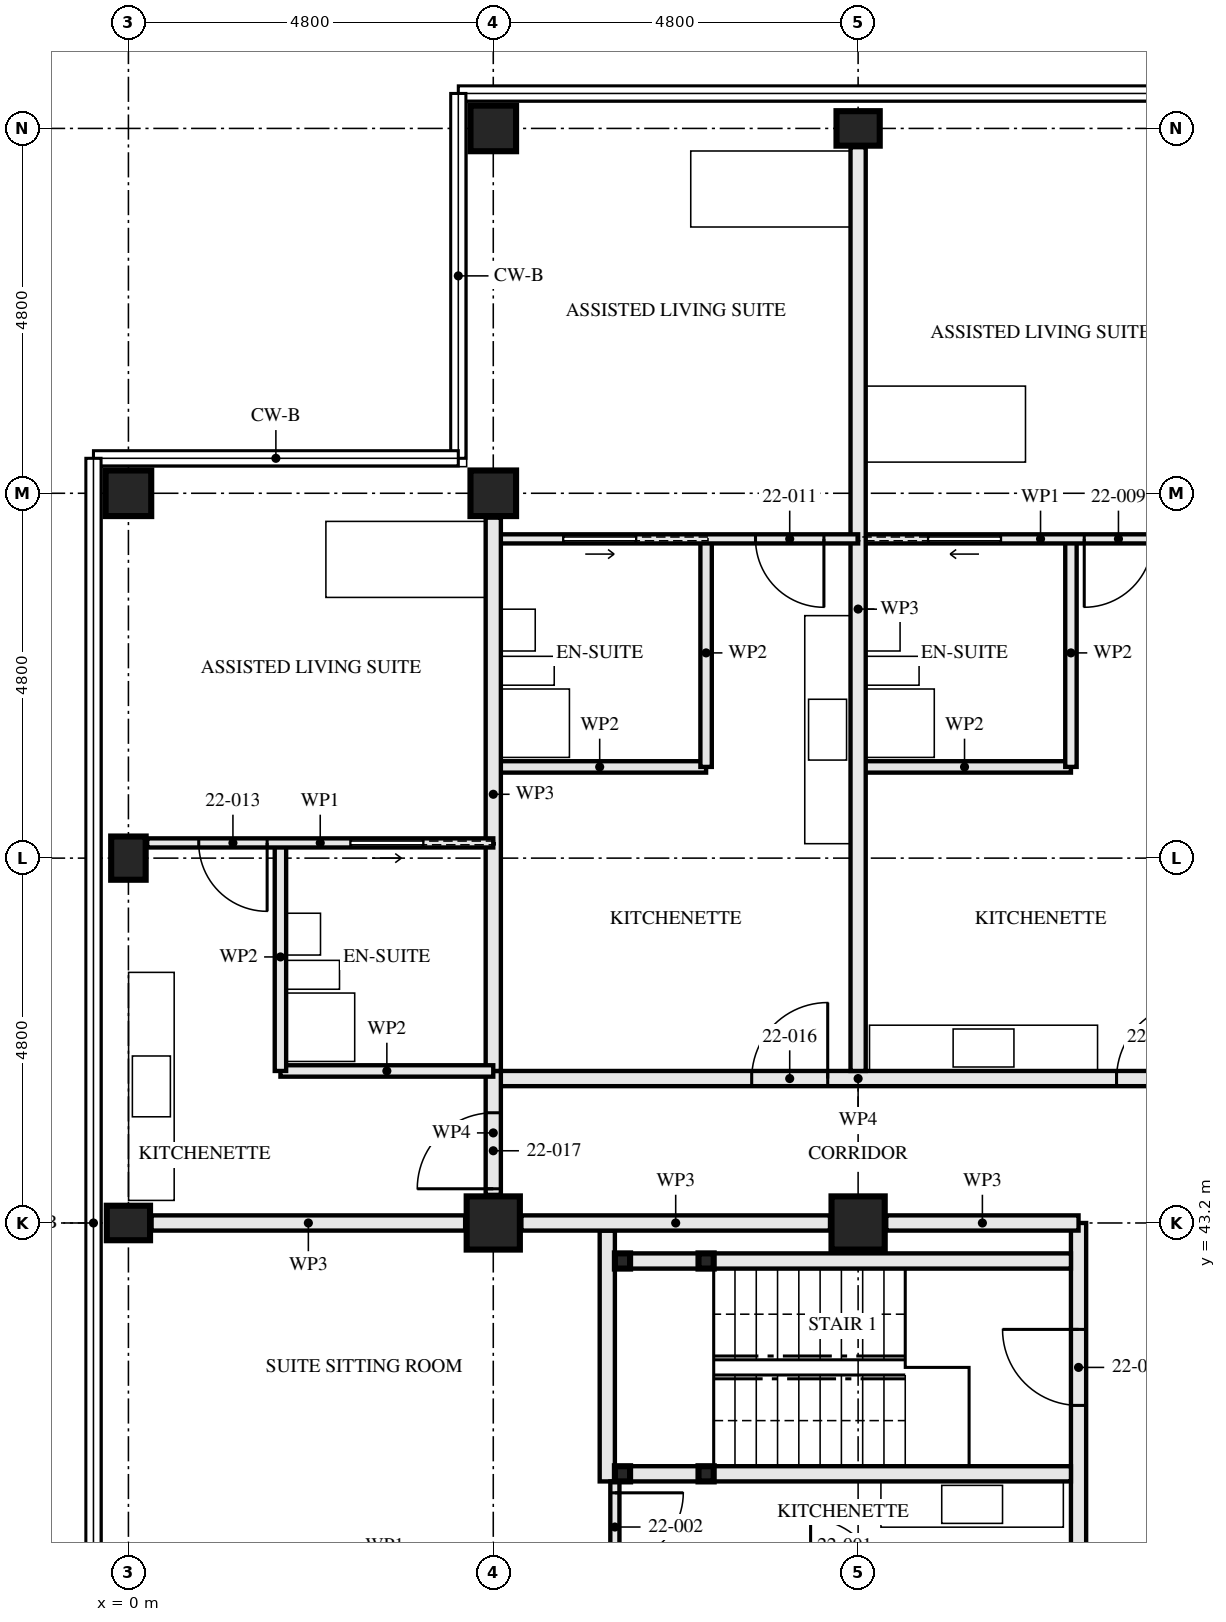
"""IFC4 building model, lengths in metres.
Left out: names, types, materials, properties, quantities, classifications, styles, units other than length and angle.
Written with IfcOpenShell. Run it as: python <this file> out.ifc"""

import sys

from ifc_helpers import new_model, si_unit, direction, frame, frame_2d, origin, origin_2d, place, context, subcontext, project, spatial, rectangle, hollow_rectangle, i_section, extrude, element, fill, save


model = new_model("IFC4")
c1 = context("Model", 3, precision=1e-05, world=origin(), true_north=direction((0.0, 1.0)))
c2 = subcontext(c1, "Body", "Model", "MODEL_VIEW")
j1 = project(units=[si_unit("LENGTHUNIT", "METRE"), si_unit("PLANEANGLEUNIT", "RADIAN")], contexts=[c1])
p1 = place(None, origin())
s1 = spatial("IfcSite", under=j1, at=p1, CompositionType="ELEMENT")
p2 = place(p1, origin())
s2 = spatial("IfcBuilding", under=s1, at=p2, CompositionType="ELEMENT")
p3 = place(p2, frame((0.0, 0.0, 84.0)))
s3 = spatial("IfcBuildingStorey", under=s2, at=p3, CompositionType="ELEMENT", Elevation=84.0)
for number, where, z_axis, x_axis in (
    (1, (0.0, 43.2, 0.0), (0.0, 0.0, 1.0), (0.0, 1.0, 0.0)),
    (2, (0.0, 48.0, 0.0), (0.0, 0.0, 1.0), (1.0, 0.0, 0.0)),
):
    element("IfcColumn", number, at=place(p3, frame(where, z_axis=z_axis, x_axis=x_axis)), inside=s3, PredefinedType="COLUMN", context=c2, shape_type="SweptSolid", body=[
        extrude(i_section(OverallWidth=0.454, OverallDepth=0.569, WebThickness=0.078, FlangeThickness=0.125, FilletRadius=0.015, at=origin_2d()), origin(), (0.0, 0.0, 1.0), 3.5),
    ])
p4 = place(p3, frame((0.0, 52.8, 0.0), z_axis=(0.0, 0.0, 1.0), x_axis=(0.0, 1.0, 0.0)))
e3 = element("IfcColumn", 3, at=p4, inside=s3, PredefinedType="COLUMN", context=c2, shape_type="SweptSolid", body=[
    extrude(hollow_rectangle(XDim=0.6, YDim=0.6, WallThickness=0.05, at=origin_2d()), origin(), (0.0, 0.0, 1.0), 3.5),
])
p5 = place(p3, frame((4.8, 43.2, 0.0), z_axis=(0.0, 0.0, 1.0), x_axis=(0.0, 1.0, 0.0)))
e4 = element("IfcColumn", 4, at=p5, inside=s3, PredefinedType="COLUMN", context=c2, shape_type="SweptSolid", body=[
    extrude(hollow_rectangle(XDim=0.7, YDim=0.7, WallThickness=0.06, at=origin_2d()), origin(), (0.0, 0.0, 1.0), 3.5),
])
for number, where, z_axis, x_axis in (
    (5, (4.8, 52.8, 0.0), (0.0, 0.0, 1.0), (0.0, 1.0, 0.0)),
    (6, (4.8, 57.6, 0.0), (0.0, 0.0, 1.0), (0.0, 1.0, 0.0)),
):
    element("IfcColumn", number, at=place(p3, frame(where, z_axis=z_axis, x_axis=x_axis)), inside=s3, PredefinedType="COLUMN", context=c2, shape_type="SweptSolid", body=[
        extrude(hollow_rectangle(XDim=0.6, YDim=0.6, WallThickness=0.05, at=origin_2d()), origin(), (0.0, 0.0, 1.0), 3.5),
    ])
p6 = place(p3, frame((9.6, 43.2, 0.0), z_axis=(0.0, 0.0, 1.0), x_axis=(0.0, 1.0, 0.0)))
e7 = element("IfcColumn", 7, at=p6, inside=s3, PredefinedType="COLUMN", context=c2, shape_type="SweptSolid", body=[
    extrude(hollow_rectangle(XDim=0.7, YDim=0.7, WallThickness=0.06, at=origin_2d()), origin(), (0.0, 0.0, 1.0), 3.5),
])
p7 = place(p3, frame((9.6, 57.6, 0.0), z_axis=(0.0, 0.0, 1.0), x_axis=(0.0, 1.0, 0.0)))
e8 = element("IfcColumn", 8, at=p7, inside=s3, PredefinedType="COLUMN", context=c2, shape_type="SweptSolid", body=[
    extrude(i_section(OverallWidth=0.454, OverallDepth=0.569, WebThickness=0.078, FlangeThickness=0.125, FilletRadius=0.015, at=origin_2d()), origin(), (0.0, 0.0, 1.0), 3.5),
])
for number, where, z_axis, x_axis in (
    (9, (6.5, 42.7, 0.0), (0.0, 0.0, 1.0), (1.0, 0.0, 0.0)),
    (10, (6.5, 39.9, 0.0), (0.0, 0.0, 1.0), (1.0, 0.0, 0.0)),
    (11, (7.6, 42.7, 0.0), (0.0, 0.0, 1.0), (1.0, 0.0, 0.0)),
    (12, (7.6, 39.9, 0.0), (0.0, 0.0, 1.0), (1.0, 0.0, 0.0)),
):
    element("IfcColumn", number, at=place(p3, frame(where, z_axis=z_axis, x_axis=x_axis)), inside=s3, PredefinedType="COLUMN", context=c2, shape_type="SweptSolid", body=[
        extrude(hollow_rectangle(XDim=0.2, YDim=0.2, WallThickness=0.008, at=origin_2d()), origin(), (0.0, 0.0, 1.0), 3.33),
    ])
p8 = place(p3, frame((6.6, 42.7, 0.0), z_axis=(0.0, 0.0, 1.0), x_axis=(1.0, 0.0, 0.0)))
e13 = element("IfcWall", 13, at=p8, inside=s3, PredefinedType="SOLIDWALL", context=c2, shape_type="SweptSolid", body=[
    extrude(rectangle(XDim=0.9, YDim=0.2, at=frame_2d((0.45, 0.0))), origin(), (0.0, 0.0, 1.0), 2.99),
])
p9 = place(p3, frame((7.7, 42.7, 0.0), z_axis=(0.0, 0.0, 1.0), x_axis=(1.0, 0.0, 0.0)))
e14 = element("IfcWall", 14, at=p9, inside=s3, PredefinedType="SOLIDWALL", context=c2, shape_type="SweptSolid", body=[
    extrude(rectangle(XDim=4.7, YDim=0.2, at=frame_2d((2.35, 0.0))), origin(), (0.0, 0.0, 1.0), 2.99),
])
p10 = place(p3, frame((6.6, 39.9, 0.0), z_axis=(0.0, 0.0, 1.0), x_axis=(1.0, 0.0, 0.0)))
e15 = element("IfcWall", 15, at=p10, inside=s3, PredefinedType="SOLIDWALL", context=c2, shape_type="SweptSolid", body=[
    extrude(rectangle(XDim=0.9, YDim=0.2, at=frame_2d((0.45, 0.0))), origin(), (0.0, 0.0, 1.0), 2.99),
])
p11 = place(p3, frame((7.7, 39.9, 0.0), z_axis=(0.0, 0.0, 1.0), x_axis=(1.0, 0.0, 0.0)))
e16 = element("IfcWall", 16, at=p11, inside=s3, PredefinedType="SOLIDWALL", context=c2, shape_type="SweptSolid", body=[
    extrude(rectangle(XDim=4.7, YDim=0.2, at=frame_2d((2.35, 0.0))), origin(), (0.0, 0.0, 1.0), 2.99),
])
p12 = place(p3, frame((6.3, 43.1, 0.0), z_axis=(0.0, 0.0, 1.0), x_axis=(0.0, -1.0, 0.0)))
e17 = element("IfcWall", 17, at=p12, inside=s3, PredefinedType="SOLIDWALL", context=c2, shape_type="SweptSolid", body=[
    extrude(rectangle(XDim=3.3, YDim=0.2, at=frame_2d((1.65, 0.0))), origin(), (0.0, 0.0, 1.0), 3.33),
])
p13 = place(p3, frame((6.4, 39.8, 0.0), z_axis=(0.0, 0.0, 1.0), x_axis=(0.0, -1.0, 0.0)))
e18 = element("IfcWall", 18, at=p13, inside=s3, PredefinedType="PARTITIONING", context=c2, shape_type="SweptSolid", body=[
    extrude(rectangle(XDim=1.4, YDim=0.12, at=frame_2d((0.7, 0.0))), origin(), (0.0, 0.0, 1.0), 3.33),
])
p14 = place(p13, frame((0.15, 0.0, 0.0)))
e19 = element("IfcOpeningElement", 19, at=p14, cuts=e18, PredefinedType="OPENING", context=c2, shape_type="SweptSolid", body=[
    extrude(rectangle(XDim=0.9, YDim=2.1, at=frame_2d((0.45, 1.05))), frame((0.0, 0.071, 0.0), z_axis=(0.0, -1.0, 0.0), x_axis=(1.0, 0.0, 0.0)), (0.0, 0.0, 1.0), 0.141),
])
p15 = place(p3, frame((12.5, 43.2, 0.0), z_axis=(0.0, 0.0, 1.0), x_axis=(0.0, -1.0, 0.0)))
e20 = element("IfcWall", 20, at=p15, inside=s3, PredefinedType="PARTITIONING", context=c2, shape_type="SweptSolid", body=[
    extrude(rectangle(XDim=12.4, YDim=0.2, at=frame_2d((6.2, 0.0))), origin(), (0.0, 0.0, 1.0), 2.55),
])
p16 = place(p15, frame((1.4, 0.0, 0.0)))
e21 = element("IfcOpeningElement", 21, at=p16, cuts=e20, PredefinedType="OPENING", context=c2, shape_type="SweptSolid", body=[
    extrude(rectangle(XDim=1.0, YDim=2.1, at=frame_2d((0.5, 1.05))), frame((0.0, 0.111, 0.0), z_axis=(0.0, -1.0, 0.0), x_axis=(1.0, 0.0, 0.0)), (0.0, 0.0, 1.0), 0.221),
])
p17 = place(p15, frame((5.2, 0.0, 0.0)))
e22 = element("IfcOpeningElement", 22, at=p17, cuts=e20, PredefinedType="OPENING", context=c2, shape_type="SweptSolid", body=[
    extrude(rectangle(XDim=1.0, YDim=2.1, at=frame_2d((0.5, 1.05))), frame((0.0, 0.111, 0.0), z_axis=(0.0, -1.0, 0.0), x_axis=(1.0, 0.0, 0.0)), (0.0, 0.0, 1.0), 0.221),
])
p18 = place(p3, frame((12.4, 52.2, 0.0), z_axis=(0.0, 0.0, 1.0), x_axis=(0.0, -1.0, 0.0)))
e23 = element("IfcWall", 23, at=p18, inside=s3, PredefinedType="PARTITIONING", context=c2, shape_type="SweptSolid", body=[
    extrude(rectangle(XDim=3.0, YDim=0.15, at=frame_2d((1.5, 0.0))), origin(), (0.0, 0.0, 1.0), 3.33),
])
p19 = place(p3, frame((12.4, 49.2, 0.0), z_axis=(0.0, 0.0, 1.0), x_axis=(-1.0, 0.0, 0.0)))
e24 = element("IfcWall", 24, at=p19, inside=s3, PredefinedType="PARTITIONING", context=c2, shape_type="SweptSolid", body=[
    extrude(rectangle(XDim=2.8, YDim=0.15, at=frame_2d((1.4, 0.0))), origin(), (0.0, 0.0, 1.0), 3.33),
])
p20 = place(p3, frame((14.4, 52.2, 0.0), z_axis=(0.0, 0.0, 1.0), x_axis=(-1.0, 0.0, 0.0)))
e25 = element("IfcWall", 25, at=p20, inside=s3, PredefinedType="PARTITIONING", context=c2, shape_type="SweptSolid", body=[
    extrude(rectangle(XDim=4.8, YDim=0.12, at=frame_2d((2.4, 0.0))), origin(), (0.0, 0.0, 1.0), 3.33),
])
p21 = place(p20, frame((0.925, 0.0, 0.0)))
e26 = element("IfcOpeningElement", 26, at=p21, cuts=e25, PredefinedType="OPENING", context=c2, shape_type="SweptSolid", body=[
    extrude(rectangle(XDim=0.9, YDim=2.1, at=frame_2d((0.45, 1.05))), frame((0.0, 0.071, 0.0), z_axis=(0.0, -1.0, 0.0), x_axis=(1.0, 0.0, 0.0)), (0.0, 0.0, 1.0), 0.141),
])
p22 = place(p20, frame((2.925, 0.0, 0.0)))
e27 = element("IfcOpeningElement", 27, at=p22, cuts=e25, PredefinedType="OPENING", context=c2, shape_type="SweptSolid", body=[
    extrude(rectangle(XDim=0.95, YDim=2.1, at=frame_2d((0.475, 1.05))), frame((0.0, 0.071, 0.0), z_axis=(0.0, -1.0, 0.0), x_axis=(1.0, 0.0, 0.0)), (0.0, 0.0, 1.0), 0.141),
])
p23 = place(p3, frame((9.6, 57.353, 0.0), z_axis=(0.0, 0.0, 1.0), x_axis=(0.0, -1.0, 0.0)))
e28 = element("IfcWall", 28, at=p23, inside=s3, PredefinedType="PARTITIONING", context=c2, shape_type="SweptSolid", body=[
    extrude(rectangle(XDim=12.153, YDim=0.2, at=frame_2d((6.077, 0.0))), origin(), (0.0, 0.0, 1.0), 2.55),
])
p24 = place(p3, frame((7.6, 52.2, 0.0), z_axis=(0.0, 0.0, 1.0), x_axis=(0.0, -1.0, 0.0)))
e29 = element("IfcWall", 29, at=p24, inside=s3, PredefinedType="PARTITIONING", context=c2, shape_type="SweptSolid", body=[
    extrude(rectangle(XDim=3.0, YDim=0.15, at=frame_2d((1.5, 0.0))), origin(), (0.0, 0.0, 1.0), 3.33),
])
p25 = place(p3, frame((7.6, 49.2, 0.0), z_axis=(0.0, 0.0, 1.0), x_axis=(-1.0, 0.0, 0.0)))
e30 = element("IfcWall", 30, at=p25, inside=s3, PredefinedType="PARTITIONING", context=c2, shape_type="SweptSolid", body=[
    extrude(rectangle(XDim=2.8, YDim=0.15, at=frame_2d((1.4, 0.0))), origin(), (0.0, 0.0, 1.0), 3.33),
])
p26 = place(p3, frame((9.6, 52.2, 0.0), z_axis=(0.0, 0.0, 1.0), x_axis=(-1.0, 0.0, 0.0)))
e31 = element("IfcWall", 31, at=p26, inside=s3, PredefinedType="PARTITIONING", context=c2, shape_type="SweptSolid", body=[
    extrude(rectangle(XDim=4.8, YDim=0.12, at=frame_2d((2.4, 0.0))), origin(), (0.0, 0.0, 1.0), 3.33),
])
p27 = place(p26, frame((0.45, 0.0, 0.0)))
e32 = element("IfcOpeningElement", 32, at=p27, cuts=e31, PredefinedType="OPENING", context=c2, shape_type="SweptSolid", body=[
    extrude(rectangle(XDim=0.9, YDim=2.1, at=frame_2d((0.45, 1.05))), frame((0.0, 0.071, 0.0), z_axis=(0.0, -1.0, 0.0), x_axis=(1.0, 0.0, 0.0)), (0.0, 0.0, 1.0), 0.141),
])
p28 = place(p26, frame((2.925, 0.0, 0.0)))
e33 = element("IfcOpeningElement", 33, at=p28, cuts=e31, PredefinedType="OPENING", context=c2, shape_type="SweptSolid", body=[
    extrude(rectangle(XDim=0.95, YDim=2.1, at=frame_2d((0.475, 1.05))), frame((0.0, 0.071, 0.0), z_axis=(0.0, -1.0, 0.0), x_axis=(1.0, 0.0, 0.0)), (0.0, 0.0, 1.0), 0.141),
])
p29 = place(p3, frame((4.8, 52.48, 0.0), z_axis=(0.0, 0.0, 1.0), x_axis=(0.0, -1.0, 0.0)))
e34 = element("IfcWall", 34, at=p29, inside=s3, PredefinedType="PARTITIONING", context=c2, shape_type="SweptSolid", body=[
    extrude(rectangle(XDim=7.28, YDim=0.2, at=frame_2d((3.64, 0.0))), origin(), (0.0, 0.0, 1.0), 2.55),
])
p30 = place(p3, frame((2.0, 48.2, 0.0), z_axis=(0.0, 0.0, 1.0), x_axis=(0.0, -1.0, 0.0)))
e35 = element("IfcWall", 35, at=p30, inside=s3, PredefinedType="PARTITIONING", context=c2, shape_type="SweptSolid", body=[
    extrude(rectangle(XDim=3.0, YDim=0.15, at=frame_2d((1.5, 0.0))), origin(), (0.0, 0.0, 1.0), 2.55),
])
p31 = place(p3, frame((4.8, 45.2, 0.0), z_axis=(0.0, 0.0, 1.0), x_axis=(-1.0, 0.0, 0.0)))
e36 = element("IfcWall", 36, at=p31, inside=s3, PredefinedType="PARTITIONING", context=c2, shape_type="SweptSolid", body=[
    extrude(rectangle(XDim=2.8, YDim=0.15, at=frame_2d((1.4, 0.0))), origin(), (0.0, 0.0, 1.0), 3.33),
])
p32 = place(p3, frame((4.8, 48.2, 0.0), z_axis=(0.0, 0.0, 1.0), x_axis=(-1.0, 0.0, 0.0)))
e37 = element("IfcWall", 37, at=p32, inside=s3, PredefinedType="PARTITIONING", context=c2, shape_type="SweptSolid", body=[
    extrude(rectangle(XDim=4.553, YDim=0.12, at=frame_2d((2.276, 0.0))), origin(), (0.0, 0.0, 1.0), 3.33),
])
p33 = place(p32, frame((2.975, 0.0, 0.0)))
e38 = element("IfcOpeningElement", 38, at=p33, cuts=e37, PredefinedType="OPENING", context=c2, shape_type="SweptSolid", body=[
    extrude(rectangle(XDim=0.9, YDim=2.1, at=frame_2d((0.45, 1.05))), frame((0.0, 0.071, 0.0), z_axis=(0.0, -1.0, 0.0), x_axis=(1.0, 0.0, 0.0)), (0.0, 0.0, 1.0), 0.141),
])
p34 = place(p32, frame((0.925, 0.0, 0.0)))
e39 = element("IfcOpeningElement", 39, at=p34, cuts=e37, PredefinedType="OPENING", context=c2, shape_type="SweptSolid", body=[
    extrude(rectangle(XDim=0.95, YDim=2.1, at=frame_2d((0.475, 1.05))), frame((0.0, 0.071, 0.0), z_axis=(0.0, -1.0, 0.0), x_axis=(1.0, 0.0, 0.0)), (0.0, 0.0, 1.0), 0.141),
])
p35 = place(p3, frame((14.4, 45.1, 0.0), z_axis=(0.0, 0.0, 1.0), x_axis=(-1.0, 0.0, 0.0)))
e40 = element("IfcWall", 40, at=p35, inside=s3, PredefinedType="PARTITIONING", context=c2, shape_type="SweptSolid", body=[
    extrude(rectangle(XDim=9.6, YDim=0.2, at=frame_2d((4.8, 0.0))), origin(), (0.0, 0.0, 1.0), 3.33),
])
p36 = place(p35, frame((0.4, 0.0, 0.0)))
e41 = element("IfcOpeningElement", 41, at=p36, cuts=e40, PredefinedType="OPENING", context=c2, shape_type="SweptSolid", body=[
    extrude(rectangle(XDim=1.0, YDim=2.1, at=frame_2d((0.5, 1.05))), frame((0.0, 0.111, 0.0), z_axis=(0.0, -1.0, 0.0), x_axis=(1.0, 0.0, 0.0)), (0.0, 0.0, 1.0), 0.221),
])
p37 = place(p35, frame((5.2, 0.0, 0.0)))
e42 = element("IfcOpeningElement", 42, at=p37, cuts=e40, PredefinedType="OPENING", context=c2, shape_type="SweptSolid", body=[
    extrude(rectangle(XDim=1.0, YDim=2.1, at=frame_2d((0.5, 1.05))), frame((0.0, 0.111, 0.0), z_axis=(0.0, -1.0, 0.0), x_axis=(1.0, 0.0, 0.0)), (0.0, 0.0, 1.0), 0.221),
])
p38 = place(p3, frame((4.8, 45.2, 0.0), z_axis=(0.0, 0.0, 1.0), x_axis=(0.0, -1.0, 0.0)))
e43 = element("IfcWall", 43, at=p38, inside=s3, PredefinedType="PARTITIONING", context=c2, shape_type="SweptSolid", body=[
    extrude(rectangle(XDim=1.63, YDim=0.2, at=frame_2d((0.815, 0.0))), origin(), (0.0, 0.0, 1.0), 3.33),
])
p39 = place(p38, frame((0.55, 0.0, 0.0)))
e44 = element("IfcOpeningElement", 44, at=p39, cuts=e43, PredefinedType="OPENING", context=c2, shape_type="SweptSolid", body=[
    extrude(rectangle(XDim=1.0, YDim=2.1, at=frame_2d((0.5, 1.05))), frame((0.0, 0.111, 0.0), z_axis=(0.0, -1.0, 0.0), x_axis=(1.0, 0.0, 0.0)), (0.0, 0.0, 1.0), 0.221),
])
p40 = place(p3, frame((12.5, 43.2, 0.0), z_axis=(0.0, 0.0, 1.0), x_axis=(-1.0, 0.0, 0.0)))
e45 = element("IfcWall", 45, at=p40, inside=s3, PredefinedType="PARTITIONING", context=c2, shape_type="SweptSolid", body=[
    extrude(rectangle(XDim=2.53, YDim=0.2, at=frame_2d((1.265, 0.0))), origin(), (0.0, 0.0, 1.0), 2.32),
])
p41 = place(p3, frame((9.23, 43.2, 0.0), z_axis=(0.0, 0.0, 1.0), x_axis=(-1.0, 0.0, 0.0)))
e46 = element("IfcWall", 46, at=p41, inside=s3, PredefinedType="PARTITIONING", context=c2, shape_type="SweptSolid", body=[
    extrude(rectangle(XDim=4.06, YDim=0.2, at=frame_2d((2.03, 0.0))), origin(), (0.0, 0.0, 1.0), 2.32),
])
p42 = place(p3, frame((4.43, 43.2, 0.0), z_axis=(0.0, 0.0, 1.0), x_axis=(-1.0, 0.0, 0.0)))
e47 = element("IfcWall", 47, at=p42, inside=s3, PredefinedType="PARTITIONING", context=c2, shape_type="SweptSolid", body=[
    extrude(rectangle(XDim=4.125, YDim=0.2, at=frame_2d((2.063, 0.0))), origin(), (0.0, 0.0, 1.0), 2.32),
])
p43 = place(p14, origin())
e48 = element("IfcDoor", 48, at=p43, inside=s3, OperationType="SINGLE_SWING_RIGHT", PredefinedType="DOOR", context=c2, shape_type="SweptSolid", body=[
    extrude(rectangle(XDim=0.9, YDim=2.1, at=frame_2d((0.45, 1.05))), frame((0.0, 0.022, 0.0), z_axis=(0.0, -1.0, 0.0), x_axis=(1.0, 0.0, 0.0)), (0.0, 0.0, 1.0), 0.044),
])
fill(e19, e48)
p44 = place(p16, frame((1.0, 0.0, 0.0), z_axis=(0.0, 0.0, 1.0), x_axis=(-1.0, 0.0, 0.0)))
e49 = element("IfcDoor", 49, at=p44, inside=s3, OperationType="SINGLE_SWING_LEFT", PredefinedType="DOOR", context=c2, shape_type="SweptSolid", body=[
    extrude(rectangle(XDim=1.0, YDim=2.1, at=frame_2d((0.5, 1.05))), frame((0.0, 0.032, 0.0), z_axis=(0.0, -1.0, 0.0), x_axis=(1.0, 0.0, 0.0)), (0.0, 0.0, 1.0), 0.064),
])
fill(e21, e49)
p45 = place(p21, origin())
e50 = element("IfcDoor", 50, at=p45, inside=s3, OperationType="SINGLE_SWING_LEFT", PredefinedType="DOOR", context=c2, shape_type="SweptSolid", body=[
    extrude(rectangle(XDim=0.9, YDim=2.1, at=frame_2d((0.45, 1.05))), frame((0.0, 0.022, 0.0), z_axis=(0.0, -1.0, 0.0), x_axis=(1.0, 0.0, 0.0)), (0.0, 0.0, 1.0), 0.044),
])
fill(e26, e50)
p46 = place(p22, origin())
e51 = element("IfcDoor", 51, at=p46, inside=s3, OperationType="SLIDING_TO_LEFT", PredefinedType="DOOR", context=c2, shape_type="SweptSolid", body=[
    extrude(rectangle(XDim=0.95, YDim=2.1, at=frame_2d((0.475, 1.05))), frame((0.0, 0.022, 0.0), z_axis=(0.0, -1.0, 0.0), x_axis=(1.0, 0.0, 0.0)), (0.0, 0.0, 1.0), 0.044),
])
fill(e27, e51)
p47 = place(p27, origin())
e52 = element("IfcDoor", 52, at=p47, inside=s3, OperationType="SINGLE_SWING_RIGHT", PredefinedType="DOOR", context=c2, shape_type="SweptSolid", body=[
    extrude(rectangle(XDim=0.9, YDim=2.1, at=frame_2d((0.45, 1.05))), frame((0.0, 0.022, 0.0), z_axis=(0.0, -1.0, 0.0), x_axis=(1.0, 0.0, 0.0)), (0.0, 0.0, 1.0), 0.044),
])
fill(e32, e52)
p48 = place(p28, origin())
e53 = element("IfcDoor", 53, at=p48, inside=s3, OperationType="SLIDING_TO_RIGHT", PredefinedType="DOOR", context=c2, shape_type="SweptSolid", body=[
    extrude(rectangle(XDim=0.95, YDim=2.1, at=frame_2d((0.475, 1.05))), frame((0.0, 0.022, 0.0), z_axis=(0.0, -1.0, 0.0), x_axis=(1.0, 0.0, 0.0)), (0.0, 0.0, 1.0), 0.044),
])
fill(e33, e53)
p49 = place(p33, origin())
e54 = element("IfcDoor", 54, at=p49, inside=s3, OperationType="SINGLE_SWING_RIGHT", PredefinedType="DOOR", context=c2, shape_type="SweptSolid", body=[
    extrude(rectangle(XDim=0.9, YDim=2.1, at=frame_2d((0.45, 1.05))), frame((0.0, 0.022, 0.0), z_axis=(0.0, -1.0, 0.0), x_axis=(1.0, 0.0, 0.0)), (0.0, 0.0, 1.0), 0.044),
])
fill(e38, e54)
p50 = place(p34, origin())
e55 = element("IfcDoor", 55, at=p50, inside=s3, OperationType="SLIDING_TO_RIGHT", PredefinedType="DOOR", context=c2, shape_type="SweptSolid", body=[
    extrude(rectangle(XDim=0.95, YDim=2.1, at=frame_2d((0.475, 1.05))), frame((0.0, 0.022, 0.0), z_axis=(0.0, -1.0, 0.0), x_axis=(1.0, 0.0, 0.0)), (0.0, 0.0, 1.0), 0.044),
])
fill(e39, e55)
p51 = place(p36, frame((1.0, 0.0, 0.0), z_axis=(0.0, 0.0, 1.0), x_axis=(-1.0, 0.0, 0.0)))
e56 = element("IfcDoor", 56, at=p51, inside=s3, OperationType="SINGLE_SWING_LEFT", PredefinedType="DOOR", context=c2, shape_type="SweptSolid", body=[
    extrude(rectangle(XDim=1.0, YDim=2.1, at=frame_2d((0.5, 1.05))), frame((0.0, 0.027, 0.0), z_axis=(0.0, -1.0, 0.0), x_axis=(1.0, 0.0, 0.0)), (0.0, 0.0, 1.0), 0.054),
])
fill(e41, e56)
p52 = place(p37, frame((1.0, 0.0, 0.0), z_axis=(0.0, 0.0, 1.0), x_axis=(-1.0, 0.0, 0.0)))
e57 = element("IfcDoor", 57, at=p52, inside=s3, OperationType="SINGLE_SWING_LEFT", PredefinedType="DOOR", context=c2, shape_type="SweptSolid", body=[
    extrude(rectangle(XDim=1.0, YDim=2.1, at=frame_2d((0.5, 1.05))), frame((0.0, 0.027, 0.0), z_axis=(0.0, -1.0, 0.0), x_axis=(1.0, 0.0, 0.0)), (0.0, 0.0, 1.0), 0.054),
])
fill(e42, e57)
p53 = place(p39, frame((1.0, 0.0, 0.0), z_axis=(0.0, 0.0, 1.0), x_axis=(-1.0, 0.0, 0.0)))
e58 = element("IfcDoor", 58, at=p53, inside=s3, OperationType="SINGLE_SWING_RIGHT", PredefinedType="DOOR", context=c2, shape_type="SweptSolid", body=[
    extrude(rectangle(XDim=1.0, YDim=2.1, at=frame_2d((0.5, 1.05))), frame((0.0, 0.027, 0.0), z_axis=(0.0, -1.0, 0.0), x_axis=(1.0, 0.0, 0.0)), (0.0, 0.0, 1.0), 0.054),
])
fill(e44, e58)
save(model, sys.argv[1])
